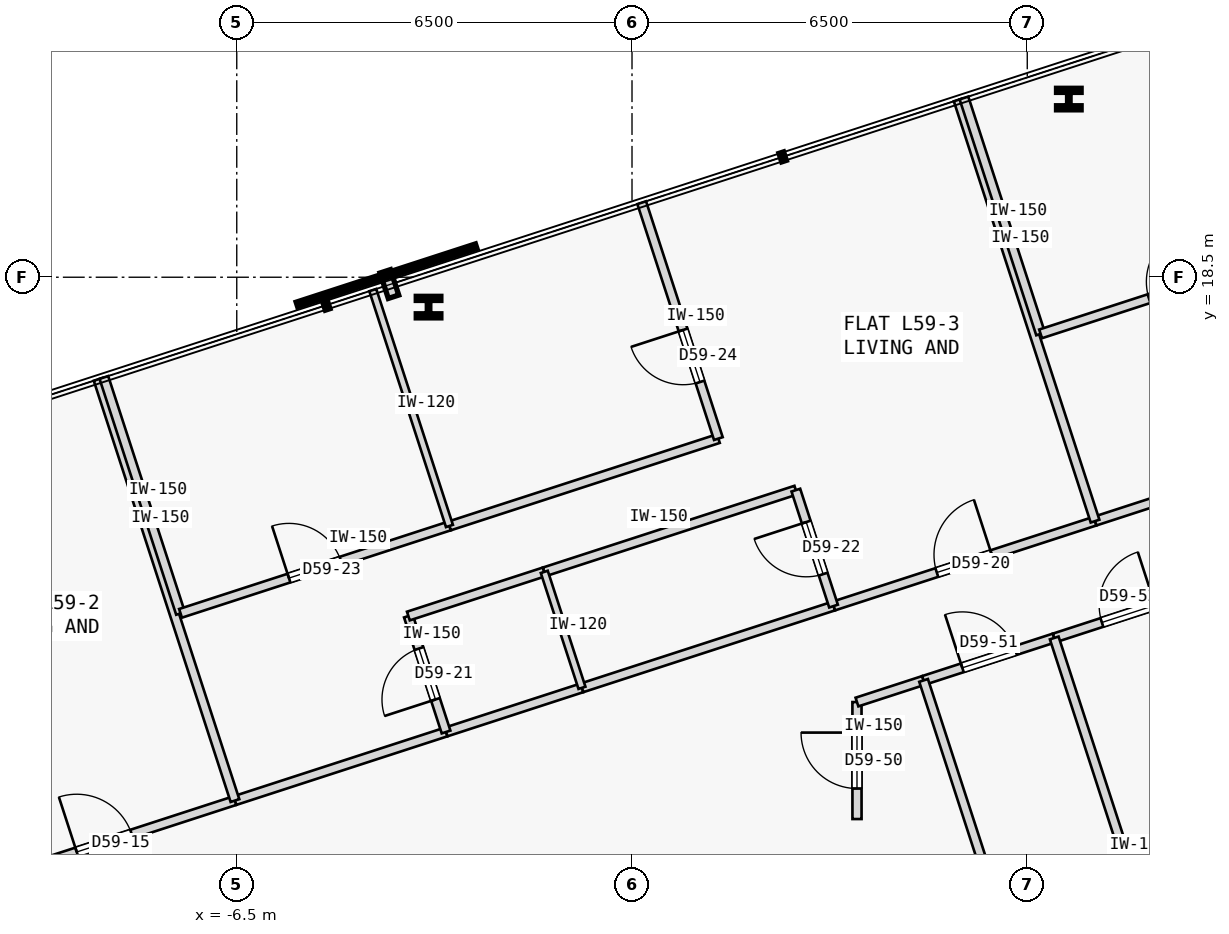
"""IFC4 building model, lengths in metres.
Left out: names, types, materials, properties, quantities, classifications, styles, units other than length and angle.
Written with IfcOpenShell. Run it as: python <this file> out.ifc"""

import sys

from ifc_helpers import new_model, si_unit, direction, frame, frame_2d, origin, origin_2d, place, context, subcontext, project, spatial, rectangle, i_section, extrude, element, fill, save


model = new_model("IFC4")
c1 = context("Model", 3, precision=1e-05, world=origin(), true_north=direction((0.0, 1.0)))
c2 = subcontext(c1, "Body", "Model", "MODEL_VIEW")
j1 = project(units=[si_unit("LENGTHUNIT", "METRE"), si_unit("PLANEANGLEUNIT", "RADIAN")], contexts=[c1])
p1 = place(None, origin())
s1 = spatial("IfcSite", under=j1, at=p1, CompositionType="ELEMENT")
p2 = place(p1, origin())
s2 = spatial("IfcBuilding", under=s1, at=p2, CompositionType="ELEMENT")
p3 = place(p2, frame((0.0, 0.0, 224.3)))
s3 = spatial("IfcBuildingStorey", under=s2, at=p3, CompositionType="ELEMENT", Elevation=224.3)
for number, where, z_axis, x_axis in (
    (1, (7.184, 21.43, 0.0), (0.0, 0.0, 1.0), (1.0, 0.0, 0.0)),
    (2, (-3.346, 18.009, 0.0), (0.0, 0.0, 1.0), (1.0, 0.0, 0.0)),
):
    element("IfcColumn", number, at=place(p3, frame(where, z_axis=z_axis, x_axis=x_axis)), inside=s3, PredefinedType="COLUMN", context=c2, shape_type="SweptSolid", body=[
        extrude(i_section(OverallWidth=0.405, OverallDepth=0.355, WebThickness=0.042, FlangeThickness=0.068, FilletRadius=0.015, at=origin_2d()), origin(), (0.0, 0.0, 1.0), 3.35),
    ])
p4 = place(p3, frame((-10.83, 8.496, 0.0), z_axis=(0.0, 0.0, 1.0), x_axis=(0.951063822327, 0.308994507816, 0.0)))
e3 = element("IfcWall", 3, at=p4, inside=s3, PredefinedType="PARTITIONING", context=c2, shape_type="SweptSolid", body=[
    extrude(rectangle(XDim=4.522, YDim=0.15, at=frame_2d((2.261, 0.0))), origin(), (0.0, 0.0, 1.0), 3.125),
])
p5 = place(p4, frame((1.786, 0.0, 0.0)))
e4 = element("IfcOpeningElement", 4, at=p5, cuts=e3, PredefinedType="OPENING", context=c2, shape_type="SweptSolid", body=[
    extrude(rectangle(XDim=0.95, YDim=2.15, at=frame_2d((0.475, 1.075))), frame((0.0, 0.085, 0.0), z_axis=(0.0, -1.0, 0.0), x_axis=(1.0, 0.0, 0.0)), (0.0, 0.0, 1.0), 0.17),
])
p6 = place(p3, frame((-6.53, 9.894, 0.0), z_axis=(0.0, 0.0, 1.0), x_axis=(0.951057168147, 0.309014988174, 0.0)))
e5 = element("IfcWall", 5, at=p6, inside=s3, PredefinedType="PARTITIONING", context=c2, shape_type="SweptSolid", body=[
    extrude(rectangle(XDim=3.65, YDim=0.15, at=frame_2d((1.825, 0.0))), origin(), (0.0, 0.0, 1.0), 3.125),
])
p7 = place(p3, frame((3.314, 13.092, 0.0), z_axis=(0.0, 0.0, 1.0), x_axis=(0.951068976929, 0.308978641858, 0.0)))
e6 = element("IfcWall", 6, at=p7, inside=s3, PredefinedType="PARTITIONING", context=c2, shape_type="SweptSolid", body=[
    extrude(rectangle(XDim=4.522, YDim=0.15, at=frame_2d((2.261, 0.0))), origin(), (0.0, 0.0, 1.0), 3.125),
])
p8 = place(p7, frame((1.786, 0.0, 0.0)))
e7 = element("IfcOpeningElement", 7, at=p8, cuts=e6, PredefinedType="OPENING", context=c2, shape_type="SweptSolid", body=[
    extrude(rectangle(XDim=0.95, YDim=2.15, at=frame_2d((0.475, 1.075))), frame((0.0, 0.085, 0.0), z_axis=(0.0, -1.0, 0.0), x_axis=(1.0, 0.0, 0.0)), (0.0, 0.0, 1.0), 0.17),
])
p9 = place(p3, frame((-3.058, 11.021, 0.0), z_axis=(0.0, 0.0, 1.0), x_axis=(0.951045519245, 0.309050837767, 0.0)))
e8 = element("IfcWall", 8, at=p9, inside=s3, PredefinedType="PARTITIONING", context=c2, shape_type="SweptSolid", body=[
    extrude(rectangle(XDim=2.35, YDim=0.15, at=frame_2d((1.175, 0.0))), origin(), (0.0, 0.0, 1.0), 3.125),
])
p10 = place(p3, frame((-0.823, 11.748, 0.0), z_axis=(0.0, 0.0, 1.0), x_axis=(0.951052627573, 0.309028962374, 0.0)))
e9 = element("IfcWall", 9, at=p10, inside=s3, PredefinedType="PARTITIONING", context=c2, shape_type="SweptSolid", body=[
    extrude(rectangle(XDim=4.35, YDim=0.15, at=frame_2d((2.175, 0.0))), origin(), (0.0, 0.0, 1.0), 3.125),
])
p11 = place(p3, frame((7.615, 14.489, 0.0), z_axis=(0.0, 0.0, 1.0), x_axis=(0.951050780541, 0.309034646652, 0.0)))
e10 = element("IfcWall", 10, at=p11, inside=s3, PredefinedType="PARTITIONING", context=c2, shape_type="SweptSolid", body=[
    extrude(rectangle(XDim=3.65, YDim=0.15, at=frame_2d((1.825, 0.0))), origin(), (0.0, 0.0, 1.0), 3.125),
])
p12 = place(p3, frame((3.7, 9.59, 0.0), z_axis=(0.0, 0.0, 1.0), x_axis=(-0.000380662325, 0.999999927548, 0.0)))
e11 = element("IfcWall", 11, at=p12, inside=s3, PredefinedType="PARTITIONING", context=c2, shape_type="SweptSolid", body=[
    extrude(rectangle(XDim=1.924, YDim=0.15, at=frame_2d((0.962, 0.0))), origin(), (0.0, 0.0, 1.0), 3.125),
])
p13 = place(p12, frame((0.502, 0.0, 0.0)))
e12 = element("IfcOpeningElement", 12, at=p13, cuts=e11, PredefinedType="OPENING", context=c2, shape_type="SweptSolid", body=[
    extrude(rectangle(XDim=0.92, YDim=2.15, at=frame_2d((0.46, 1.075))), frame((0.0, 0.085, 0.0), z_axis=(0.0, -1.0, 0.0), x_axis=(1.0, 0.0, 0.0)), (0.0, 0.0, 1.0), 0.17),
])
p14 = place(p3, frame((3.699, 11.514, 0.0), z_axis=(0.0, 0.0, 1.0), x_axis=(0.951071437281, 0.308971068529, 0.0)))
e13 = element("IfcWall", 13, at=p14, inside=s3, PredefinedType="PARTITIONING", context=c2, shape_type="SweptSolid", body=[
    extrude(rectangle(XDim=1.152, YDim=0.15, at=frame_2d((0.576, 0.0))), origin(), (0.0, 0.0, 1.0), 3.125),
])
p15 = place(p3, frame((4.795, 11.87, 0.0), z_axis=(0.0, 0.0, 1.0), x_axis=(0.951065832698, 0.308988319964, 0.0)))
e14 = element("IfcWall", 14, at=p15, inside=s3, PredefinedType="PARTITIONING", context=c2, shape_type="SweptSolid", body=[
    extrude(rectangle(XDim=2.259, YDim=0.15, at=frame_2d((1.129, 0.0))), origin(), (0.0, 0.0, 1.0), 3.125),
])
p16 = place(p15, frame((0.669, 0.0, 0.0)))
e15 = element("IfcOpeningElement", 15, at=p16, cuts=e14, PredefinedType="OPENING", context=c2, shape_type="SweptSolid", body=[
    extrude(rectangle(XDim=0.92, YDim=2.15, at=frame_2d((0.46, 1.075))), frame((0.0, 0.085, 0.0), z_axis=(0.0, -1.0, 0.0), x_axis=(1.0, 0.0, 0.0)), (0.0, 0.0, 1.0), 0.17),
])
p17 = place(p3, frame((6.944, 12.568, 0.0), z_axis=(0.0, 0.0, 1.0), x_axis=(0.951042451835, 0.309060276981, 0.0)))
e16 = element("IfcWall", 16, at=p17, inside=s3, PredefinedType="PARTITIONING", context=c2, shape_type="SweptSolid", body=[
    extrude(rectangle(XDim=2.568, YDim=0.15, at=frame_2d((1.284, 0.0))), origin(), (0.0, 0.0, 1.0), 3.125),
])
p18 = place(p17, frame((0.824, 0.0, 0.0)))
e17 = element("IfcOpeningElement", 17, at=p18, cuts=e16, PredefinedType="OPENING", context=c2, shape_type="SweptSolid", body=[
    extrude(rectangle(XDim=0.92, YDim=2.15, at=frame_2d((0.46, 1.075))), frame((0.0, 0.085, 0.0), z_axis=(0.0, -1.0, 0.0), x_axis=(1.0, 0.0, 0.0)), (0.0, 0.0, 1.0), 0.17),
])
p19 = place(p3, frame((-6.53, 9.894, 0.0), z_axis=(0.0, 0.0, 1.0), x_axis=(-0.308998913866, 0.951062390819, 0.0)))
e18 = element("IfcWall", 18, at=p19, inside=s3, PredefinedType="PARTITIONING", context=c2, shape_type="SweptSolid", body=[
    extrude(rectangle(XDim=7.284, YDim=0.15, at=frame_2d((3.642, 0.0))), origin(), (0.0, 0.0, 1.0), 3.125),
])
p20 = place(p3, frame((-3.058, 11.021, 0.0), z_axis=(0.0, 0.0, 1.0), x_axis=(-0.309022749039, 0.951054646472, 0.0)))
e19 = element("IfcWall", 19, at=p20, inside=s3, PredefinedType="PARTITIONING", context=c2, shape_type="SweptSolid", body=[
    extrude(rectangle(XDim=2.005, YDim=0.15, at=frame_2d((1.002, 0.0))), origin(), (0.0, 0.0, 1.0), 3.125),
])
p21 = place(p20, frame((0.562, 0.0, 0.0)))
e20 = element("IfcOpeningElement", 20, at=p21, cuts=e19, PredefinedType="OPENING", context=c2, shape_type="SweptSolid", body=[
    extrude(rectangle(XDim=0.88, YDim=2.15, at=frame_2d((0.44, 1.075))), frame((0.0, 0.085, 0.0), z_axis=(0.0, -1.0, 0.0), x_axis=(1.0, 0.0, 0.0)), (0.0, 0.0, 1.0), 0.17),
])
p22 = place(p3, frame((-3.678, 12.928, 0.0), z_axis=(0.0, 0.0, 1.0), x_axis=(0.951076048914, 0.308956872689, 0.0)))
e21 = element("IfcWall", 21, at=p22, inside=s3, PredefinedType="PARTITIONING", context=c2, shape_type="SweptSolid", body=[
    extrude(rectangle(XDim=2.35, YDim=0.15, at=frame_2d((1.175, 0.0))), origin(), (0.0, 0.0, 1.0), 3.125),
])
p23 = place(p3, frame((-1.443, 13.655, 0.0), z_axis=(0.0, 0.0, 1.0), x_axis=(0.951052627573, 0.309028962374, 0.0)))
e22 = element("IfcWall", 22, at=p23, inside=s3, PredefinedType="PARTITIONING", context=c2, shape_type="SweptSolid", body=[
    extrude(rectangle(XDim=4.35, YDim=0.15, at=frame_2d((2.175, 0.0))), origin(), (0.0, 0.0, 1.0), 3.125),
])
p24 = place(p3, frame((3.314, 13.092, 0.0), z_axis=(0.0, 0.0, 1.0), x_axis=(-0.309058537449, 0.951043017129, 0.0)))
e23 = element("IfcWall", 23, at=p24, inside=s3, PredefinedType="PARTITIONING", context=c2, shape_type="SweptSolid", body=[
    extrude(rectangle(XDim=2.005, YDim=0.15, at=frame_2d((1.002, 0.0))), origin(), (0.0, 0.0, 1.0), 3.125),
])
p25 = place(p24, frame((0.552, 0.0, 0.0)))
e24 = element("IfcOpeningElement", 24, at=p25, cuts=e23, PredefinedType="OPENING", context=c2, shape_type="SweptSolid", body=[
    extrude(rectangle(XDim=0.9, YDim=2.15, at=frame_2d((0.45, 1.075))), frame((0.0, 0.085, 0.0), z_axis=(0.0, -1.0, 0.0), x_axis=(1.0, 0.0, 0.0)), (0.0, 0.0, 1.0), 0.17),
])
p26 = place(p3, frame((-7.425, 12.973, 0.0), z_axis=(0.0, 0.0, 1.0), x_axis=(-0.309018403393, 0.951056058476, 0.0)))
e25 = element("IfcWall", 25, at=p26, inside=s3, PredefinedType="PARTITIONING", context=c2, shape_type="SweptSolid", body=[
    extrude(rectangle(XDim=4.079, YDim=0.15, at=frame_2d((2.04, 0.0))), origin(), (0.0, 0.0, 1.0), 3.125),
])
p27 = place(p3, frame((-7.425, 12.973, 0.0), z_axis=(0.0, 0.0, 1.0), x_axis=(0.951055286502, 0.309020779263, 0.0)))
e26 = element("IfcWall", 26, at=p27, inside=s3, PredefinedType="PARTITIONING", context=c2, shape_type="SweptSolid", body=[
    extrude(rectangle(XDim=4.65, YDim=0.15, at=frame_2d((2.325, 0.0))), origin(), (0.0, 0.0, 1.0), 3.125),
])
p28 = place(p27, frame((1.875, 0.0, 0.0)))
e27 = element("IfcOpeningElement", 27, at=p28, cuts=e26, PredefinedType="OPENING", context=c2, shape_type="SweptSolid", body=[
    extrude(rectangle(XDim=0.9, YDim=2.15, at=frame_2d((0.45, 1.075))), frame((0.0, 0.085, 0.0), z_axis=(0.0, -1.0, 0.0), x_axis=(1.0, 0.0, 0.0)), (0.0, 0.0, 1.0), 0.17),
])
p29 = place(p3, frame((-3.002, 14.41, 0.0), z_axis=(0.0, 0.0, 1.0), x_axis=(0.951065702951, 0.308988719326, 0.0)))
e28 = element("IfcWall", 28, at=p29, inside=s3, PredefinedType="PARTITIONING", context=c2, shape_type="SweptSolid", body=[
    extrude(rectangle(XDim=4.65, YDim=0.15, at=frame_2d((2.325, 0.0))), origin(), (0.0, 0.0, 1.0), 3.125),
])
p30 = place(p3, frame((1.42, 15.846, 0.0), z_axis=(0.0, 0.0, 1.0), x_axis=(-0.309018403393, 0.951056058476, 0.0)))
e29 = element("IfcWall", 29, at=p30, inside=s3, PredefinedType="PARTITIONING", context=c2, shape_type="SweptSolid", body=[
    extrude(rectangle(XDim=4.079, YDim=0.15, at=frame_2d((2.04, 0.0))), origin(), (0.0, 0.0, 1.0), 3.125),
])
p31 = place(p30, frame((0.978, 0.0, 0.0)))
e30 = element("IfcOpeningElement", 30, at=p31, cuts=e29, PredefinedType="OPENING", context=c2, shape_type="SweptSolid", body=[
    extrude(rectangle(XDim=0.9, YDim=2.15, at=frame_2d((0.45, 1.075))), frame((0.0, 0.085, 0.0), z_axis=(0.0, -1.0, 0.0), x_axis=(1.0, 0.0, 0.0)), (0.0, 0.0, 1.0), 0.17),
])
p32 = place(p3, frame((7.615, 14.489, 0.0), z_axis=(0.0, 0.0, 1.0), x_axis=(-0.309029230739, 0.951052540372, 0.0)))
e31 = element("IfcWall", 31, at=p32, inside=s3, PredefinedType="PARTITIONING", context=c2, shape_type="SweptSolid", body=[
    extrude(rectangle(XDim=7.284, YDim=0.15, at=frame_2d((3.642, 0.0))), origin(), (0.0, 0.0, 1.0), 3.125),
])
p33 = place(p3, frame((-0.823, 11.748, 0.0), z_axis=(0.0, 0.0, 1.0), x_axis=(-0.309058537449, 0.951043017129, 0.0)))
e32 = element("IfcWall", 32, at=p33, inside=s3, PredefinedType="PARTITIONING", context=c2, shape_type="SweptSolid", body=[
    extrude(rectangle(XDim=2.005, YDim=0.12, at=frame_2d((1.002, 0.0))), origin(), (0.0, 0.0, 1.0), 3.125),
])
p34 = place(p3, frame((-3.002, 14.41, 0.0), z_axis=(0.0, 0.0, 1.0), x_axis=(-0.309018403393, 0.951056058476, 0.0)))
e33 = element("IfcWall", 33, at=p34, inside=s3, PredefinedType="PARTITIONING", context=c2, shape_type="SweptSolid", body=[
    extrude(rectangle(XDim=4.079, YDim=0.12, at=frame_2d((2.04, 0.0))), origin(), (0.0, 0.0, 1.0), 3.125),
])
p35 = place(p3, frame((6.719, 17.568, 0.0), z_axis=(0.0, 0.0, 1.0), x_axis=(-0.309018403393, 0.951056058476, 0.0)))
e34 = element("IfcWall", 34, at=p35, inside=s3, PredefinedType="PARTITIONING", context=c2, shape_type="SweptSolid", body=[
    extrude(rectangle(XDim=4.079, YDim=0.15, at=frame_2d((2.04, 0.0))), origin(), (0.0, 0.0, 1.0), 3.125),
])
p36 = place(p3, frame((6.719, 17.568, 0.0), z_axis=(0.0, 0.0, 1.0), x_axis=(0.951050272606, 0.309036209813, 0.0)))
e35 = element("IfcWall", 35, at=p36, inside=s3, PredefinedType="PARTITIONING", context=c2, shape_type="SweptSolid", body=[
    extrude(rectangle(XDim=4.65, YDim=0.15, at=frame_2d((2.325, 0.0))), origin(), (0.0, 0.0, 1.0), 3.125),
])
p37 = place(p36, frame((1.875, 0.0, 0.0)))
e36 = element("IfcOpeningElement", 36, at=p37, cuts=e35, PredefinedType="OPENING", context=c2, shape_type="SweptSolid", body=[
    extrude(rectangle(XDim=0.9, YDim=2.15, at=frame_2d((0.45, 1.075))), frame((0.0, 0.085, 0.0), z_axis=(0.0, -1.0, 0.0), x_axis=(1.0, 0.0, 0.0)), (0.0, 0.0, 1.0), 0.17),
])
p38 = place(p3, frame((6.833, 5.6, 0.0), z_axis=(0.0, 0.0, 1.0), x_axis=(-0.309019923183, 0.951055564663, 0.0)))
e37 = element("IfcWall", 37, at=p38, inside=s3, PredefinedType="PARTITIONING", context=c2, shape_type="SweptSolid", body=[
    extrude(rectangle(XDim=6.593, YDim=0.15, at=frame_2d((3.296, 0.0))), origin(), (0.0, 0.0, 1.0), 2.675),
])
p39 = place(p3, frame((9.208, 5.6, 0.0), z_axis=(0.0, 0.0, 1.0), x_axis=(-0.309021275068, 0.951055125403, 0.0)))
e38 = element("IfcWall", 38, at=p39, inside=s3, PredefinedType="PARTITIONING", context=c2, shape_type="SweptSolid", body=[
    extrude(rectangle(XDim=7.327, YDim=0.15, at=frame_2d((3.664, 0.0))), origin(), (0.0, 0.0, 1.0), 3.125),
])
p40 = place(p5, origin())
e39 = element("IfcDoor", 39, at=p40, inside=s3, OperationType="SINGLE_SWING_LEFT", PredefinedType="DOOR", context=c2, shape_type="SweptSolid", body=[
    extrude(rectangle(XDim=0.95, YDim=2.15, at=frame_2d((0.475, 1.075))), frame((0.0, 0.025, 0.0), z_axis=(0.0, -1.0, 0.0), x_axis=(1.0, 0.0, 0.0)), (0.0, 0.0, 1.0), 0.05),
])
fill(e4, e39)
p41 = place(p8, origin())
e40 = element("IfcDoor", 40, at=p41, inside=s3, OperationType="SINGLE_SWING_RIGHT", PredefinedType="DOOR", context=c2, shape_type="SweptSolid", body=[
    extrude(rectangle(XDim=0.95, YDim=2.15, at=frame_2d((0.475, 1.075))), frame((0.0, 0.025, 0.0), z_axis=(0.0, -1.0, 0.0), x_axis=(1.0, 0.0, 0.0)), (0.0, 0.0, 1.0), 0.05),
])
fill(e7, e40)
p42 = place(p21, origin())
e41 = element("IfcDoor", 41, at=p42, inside=s3, OperationType="SINGLE_SWING_LEFT", PredefinedType="DOOR", context=c2, shape_type="SweptSolid", body=[
    extrude(rectangle(XDim=0.88, YDim=2.15, at=frame_2d((0.44, 1.075))), frame((0.0, 0.025, 0.0), z_axis=(0.0, -1.0, 0.0), x_axis=(1.0, 0.0, 0.0)), (0.0, 0.0, 1.0), 0.05),
])
fill(e20, e41)
p43 = place(p25, origin())
e42 = element("IfcDoor", 42, at=p43, inside=s3, OperationType="SINGLE_SWING_RIGHT", PredefinedType="DOOR", context=c2, shape_type="SweptSolid", body=[
    extrude(rectangle(XDim=0.9, YDim=2.15, at=frame_2d((0.45, 1.075))), frame((0.0, 0.025, 0.0), z_axis=(0.0, -1.0, 0.0), x_axis=(1.0, 0.0, 0.0)), (0.0, 0.0, 1.0), 0.05),
])
fill(e24, e42)
p44 = place(p28, origin())
e43 = element("IfcDoor", 43, at=p44, inside=s3, OperationType="SINGLE_SWING_LEFT", PredefinedType="DOOR", context=c2, shape_type="SweptSolid", body=[
    extrude(rectangle(XDim=0.9, YDim=2.15, at=frame_2d((0.45, 1.075))), frame((0.0, 0.025, 0.0), z_axis=(0.0, -1.0, 0.0), x_axis=(1.0, 0.0, 0.0)), (0.0, 0.0, 1.0), 0.05),
])
fill(e27, e43)
p45 = place(p31, origin())
e44 = element("IfcDoor", 44, at=p45, inside=s3, OperationType="SINGLE_SWING_RIGHT", PredefinedType="DOOR", context=c2, shape_type="SweptSolid", body=[
    extrude(rectangle(XDim=0.9, YDim=2.15, at=frame_2d((0.45, 1.075))), frame((0.0, 0.025, 0.0), z_axis=(0.0, -1.0, 0.0), x_axis=(1.0, 0.0, 0.0)), (0.0, 0.0, 1.0), 0.05),
])
fill(e30, e44)
p46 = place(p37, origin())
e45 = element("IfcDoor", 45, at=p46, inside=s3, OperationType="SINGLE_SWING_RIGHT", PredefinedType="DOOR", context=c2, shape_type="SweptSolid", body=[
    extrude(rectangle(XDim=0.9, YDim=2.15, at=frame_2d((0.45, 1.075))), frame((0.0, 0.025, 0.0), z_axis=(0.0, -1.0, 0.0), x_axis=(1.0, 0.0, 0.0)), (0.0, 0.0, 1.0), 0.05),
])
fill(e36, e45)
p47 = place(p13, origin())
e46 = element("IfcDoor", 46, at=p47, inside=s3, OperationType="SINGLE_SWING_RIGHT", PredefinedType="DOOR", context=c2, shape_type="SweptSolid", body=[
    extrude(rectangle(XDim=0.92, YDim=2.15, at=frame_2d((0.46, 1.075))), frame((0.0, 0.025, 0.0), z_axis=(0.0, -1.0, 0.0), x_axis=(1.0, 0.0, 0.0)), (0.0, 0.0, 1.0), 0.05),
])
fill(e12, e46)
p48 = place(p16, origin())
e47 = element("IfcDoor", 47, at=p48, inside=s3, OperationType="SINGLE_SWING_LEFT", PredefinedType="DOOR", context=c2, shape_type="SweptSolid", body=[
    extrude(rectangle(XDim=0.92, YDim=2.15, at=frame_2d((0.46, 1.075))), frame((0.0, 0.025, 0.0), z_axis=(0.0, -1.0, 0.0), x_axis=(1.0, 0.0, 0.0)), (0.0, 0.0, 1.0), 0.05),
])
fill(e15, e47)
p49 = place(p18, origin())
e48 = element("IfcDoor", 48, at=p49, inside=s3, OperationType="SINGLE_SWING_RIGHT", PredefinedType="DOOR", context=c2, shape_type="SweptSolid", body=[
    extrude(rectangle(XDim=0.92, YDim=2.15, at=frame_2d((0.46, 1.075))), frame((0.0, 0.025, 0.0), z_axis=(0.0, -1.0, 0.0), x_axis=(1.0, 0.0, 0.0)), (0.0, 0.0, 1.0), 0.05),
])
fill(e17, e48)
save(model, sys.argv[1])
